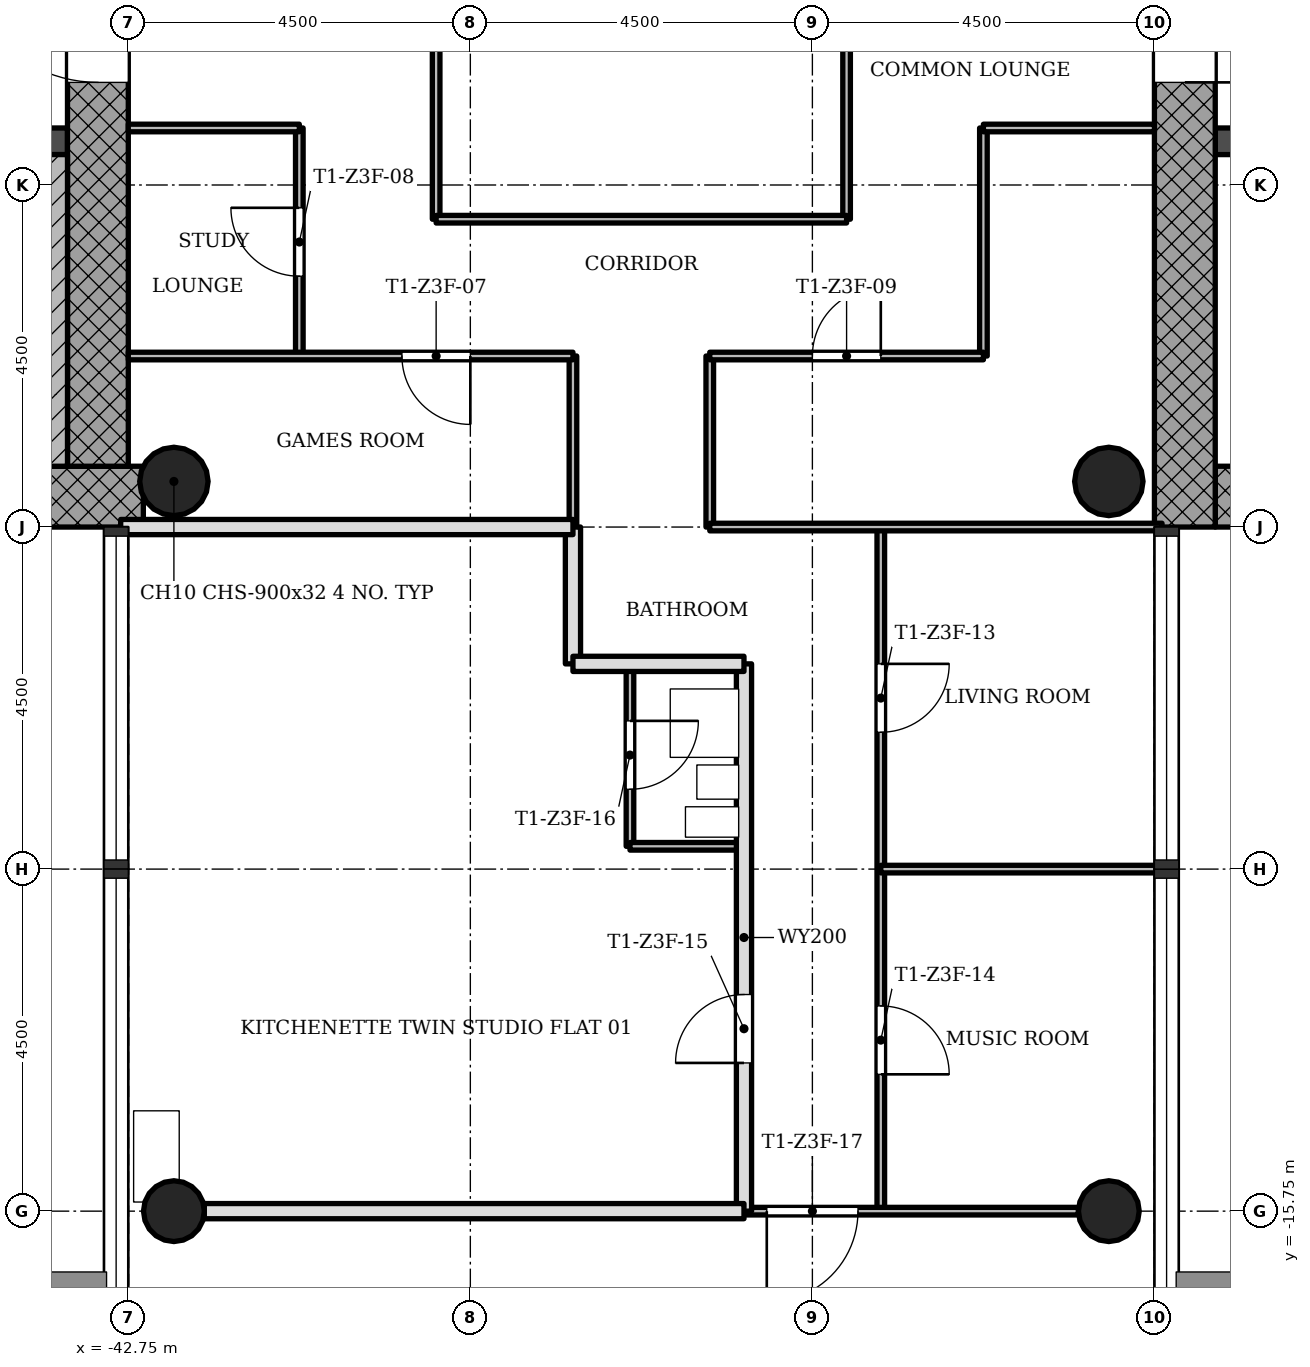
"""IFC4 building model, lengths in metres.
Left out: names, types, materials, properties, quantities, classifications, styles, units other than length and angle.
Written with IfcOpenShell. Run it as: python <this file> out.ifc"""

import sys

from ifc_helpers import new_model, si_unit, direction, frame, frame_2d, origin, origin_2d, place, context, subcontext, project, spatial, rectangle, hollow_circle, extrude, element, fill, save


model = new_model("IFC4")
c1 = context("Model", 3, precision=1e-05, world=origin(), true_north=direction((0.0, 1.0)))
c2 = subcontext(c1, "Body", "Model", "MODEL_VIEW")
j1 = project(units=[si_unit("LENGTHUNIT", "METRE"), si_unit("PLANEANGLEUNIT", "RADIAN")], contexts=[c1])
p1 = place(None, origin())
s1 = spatial("IfcSite", under=j1, at=p1, CompositionType="ELEMENT")
p2 = place(p1, origin())
s2 = spatial("IfcBuilding", under=s1, at=p2, CompositionType="ELEMENT")
p3 = place(p2, frame((0.0, 0.0, 171.1)))
s3 = spatial("IfcBuildingStorey", under=s2, at=p3, CompositionType="ELEMENT", Elevation=171.1)
p4 = place(p3, frame((-28.45, -6.35, 0.0), z_axis=(0.0, 0.0, 1.0), x_axis=(1.0, 0.0, 0.0)))
e1 = element("IfcWall", 1, at=p4, inside=s3, PredefinedType="SHEAR", context=c2, shape_type="SweptSolid", body=[
    extrude(rectangle(XDim=8.2, YDim=0.8, at=frame_2d((4.1, 0.0))), origin(), (0.0, 0.0, 1.0), 3.4),
])
p5 = place(p3, frame((-28.85, 5.95, 0.0), z_axis=(0.0, 0.0, 1.0), x_axis=(0.0, -1.0, 0.0)))
e2 = element("IfcWall", 2, at=p5, inside=s3, PredefinedType="SHEAR", context=c2, shape_type="SweptSolid", body=[
    extrude(rectangle(XDim=12.7, YDim=0.8, at=frame_2d((6.35, 0.0))), origin(), (0.0, 0.0, 1.0), 3.4),
])
p6 = place(p5, frame((5.05, 0.0, 0.0)))
e3 = element("IfcOpeningElement", 3, at=p6, cuts=e2, PredefinedType="OPENING", context=c2, shape_type="SweptSolid", body=[
    extrude(rectangle(XDim=1.8, YDim=2.1, at=frame_2d((0.9, 1.05))), frame((0.0, 0.41, 0.0), z_axis=(0.0, -1.0, 0.0), x_axis=(1.0, 0.0, 0.0)), (0.0, 0.0, 1.0), 0.82),
])
p7 = place(p3, frame((-28.45, -1.675, 0.0), z_axis=(0.0, 0.0, 1.0), x_axis=(1.0, 0.0, 0.0)))
e4 = element("IfcWall", 4, at=p7, inside=s3, PredefinedType="SHEAR", context=c2, shape_type="SweptSolid", body=[
    extrude(rectangle(XDim=7.4, YDim=0.35, at=frame_2d((3.7, 0.0))), origin(), (0.0, 0.0, 1.0), 3.4),
])
p8 = place(p7, frame((0.95, 0.0, 0.0)))
e5 = element("IfcOpeningElement", 5, at=p8, cuts=e4, PredefinedType="OPENING", context=c2, shape_type="SweptSolid", body=[
    extrude(rectangle(XDim=1.1, YDim=2.1, at=frame_2d((0.55, 1.05))), frame((0.0, 0.185, 0.0), z_axis=(0.0, -1.0, 0.0), x_axis=(1.0, 0.0, 0.0)), (0.0, 0.0, 1.0), 0.37),
])
p9 = place(p7, frame((3.15, 0.0, 0.0)))
e6 = element("IfcOpeningElement", 6, at=p9, cuts=e4, PredefinedType="OPENING", context=c2, shape_type="SweptSolid", body=[
    extrude(rectangle(XDim=1.1, YDim=2.1, at=frame_2d((0.55, 1.05))), frame((0.0, 0.185, 0.0), z_axis=(0.0, -1.0, 0.0), x_axis=(1.0, 0.0, 0.0)), (0.0, 0.0, 1.0), 0.37),
])
p10 = place(p7, frame((5.35, 0.0, 0.0)))
e7 = element("IfcOpeningElement", 7, at=p10, cuts=e4, PredefinedType="OPENING", context=c2, shape_type="SweptSolid", body=[
    extrude(rectangle(XDim=1.1, YDim=2.1, at=frame_2d((0.55, 1.05))), frame((0.0, 0.185, 0.0), z_axis=(0.0, -1.0, 0.0), x_axis=(1.0, 0.0, 0.0)), (0.0, 0.0, 1.0), 0.37),
])
p11 = place(p3, frame((-50.95, -6.35, 0.0), z_axis=(0.0, 0.0, 1.0), x_axis=(1.0, 0.0, 0.0)))
e8 = element("IfcWall", 8, at=p11, inside=s3, PredefinedType="SHEAR", context=c2, shape_type="SweptSolid", body=[
    extrude(rectangle(XDim=8.398, YDim=0.8, at=frame_2d((4.199, 0.0))), origin(), (0.0, 0.0, 1.0), 3.4),
])
p12 = place(p3, frame((-43.15, -5.95, 0.0), z_axis=(0.0, 0.0, 1.0), x_axis=(0.0, 1.0, 0.0)))
e9 = element("IfcWall", 9, at=p12, inside=s3, PredefinedType="SHEAR", context=c2, shape_type="SweptSolid", body=[
    extrude(rectangle(XDim=12.7, YDim=0.8, at=frame_2d((6.35, 0.0))), origin(), (0.0, 0.0, 1.0), 3.4),
])
p13 = place(p12, frame((5.05, 0.0, 0.0)))
e10 = element("IfcOpeningElement", 10, at=p13, cuts=e9, PredefinedType="OPENING", context=c2, shape_type="SweptSolid", body=[
    extrude(rectangle(XDim=1.8, YDim=2.1, at=frame_2d((0.9, 1.05))), frame((0.0, 0.41, 0.0), z_axis=(0.0, -1.0, 0.0), x_axis=(1.0, 0.0, 0.0)), (0.0, 0.0, 1.0), 0.82),
])
p14 = place(p3, frame((-50.95, -1.675, 0.0), z_axis=(0.0, 0.0, 1.0), x_axis=(1.0, 0.0, 0.0)))
e11 = element("IfcWall", 11, at=p14, inside=s3, PredefinedType="SHEAR", context=c2, shape_type="SweptSolid", body=[
    extrude(rectangle(XDim=7.4, YDim=0.35, at=frame_2d((3.7, 0.0))), origin(), (0.0, 0.0, 1.0), 3.4),
])
p15 = place(p14, frame((5.65, 0.0, 0.0)))
e12 = element("IfcOpeningElement", 12, at=p15, cuts=e11, PredefinedType="OPENING", context=c2, shape_type="SweptSolid", body=[
    extrude(rectangle(XDim=0.9, YDim=2.1, at=frame_2d((0.45, 1.05))), frame((0.0, 0.185, 0.0), z_axis=(0.0, -1.0, 0.0), x_axis=(1.0, 0.0, 0.0)), (0.0, 0.0, 1.0), 0.37),
])
for number, where, z_axis, x_axis in (
    (13, (-42.15, -15.75, 0.0), (0.0, 0.0, 1.0), (1.0, 0.0, 0.0)),
    (14, (-29.85, -15.75, 0.0), (0.0, 0.0, 1.0), (1.0, 0.0, 0.0)),
):
    element("IfcColumn", number, at=place(p3, frame(where, z_axis=z_axis, x_axis=x_axis)), inside=s3, PredefinedType="COLUMN", context=c2, shape_type="SweptSolid", body=[
        extrude(hollow_circle(Radius=0.4, WallThickness=0.028, at=origin_2d()), origin(), (0.0, 0.0, 1.0), 3.4),
    ])
for number, where, z_axis, x_axis in (
    (15, (-42.15, -6.15, 0.0), (0.0, 0.0, 1.0), (1.0, 0.0, 0.0)),
    (16, (-29.85, -6.15, 0.0), (0.0, 0.0, 1.0), (1.0, 0.0, 0.0)),
):
    element("IfcColumn", number, at=place(p3, frame(where, z_axis=z_axis, x_axis=x_axis)), inside=s3, PredefinedType="COLUMN", context=c2, shape_type="SweptSolid", body=[
        extrude(hollow_circle(Radius=0.45, WallThickness=0.032, at=origin_2d()), origin(), (0.0, 0.0, 1.0), 3.4),
    ])
p16 = place(p3, frame((-40.5, -4.5, 0.0), z_axis=(0.0, 0.0, 1.0), x_axis=(0.0, 1.0, 0.0)))
e17 = element("IfcWall", 17, at=p16, inside=s3, PredefinedType="PARTITIONING", context=c2, shape_type="SweptSolid", body=[
    extrude(rectangle(XDim=3.0, YDim=0.1, at=frame_2d((1.5, 0.0))), origin(), (0.0, 0.0, 1.0), 3.0),
])
p17 = place(p16, frame((1.05, 0.0, 0.0)))
e18 = element("IfcOpeningElement", 18, at=p17, cuts=e17, PredefinedType="OPENING", context=c2, shape_type="SweptSolid", body=[
    extrude(rectangle(XDim=0.9, YDim=2.1, at=frame_2d((0.45, 1.05))), frame((0.0, 0.06, 0.0), z_axis=(0.0, -1.0, 0.0), x_axis=(1.0, 0.0, 0.0)), (0.0, 0.0, 1.0), 0.12),
])
p18 = place(p3, frame((-38.7, -2.7, 0.0), z_axis=(0.0, 0.0, 1.0), x_axis=(0.0, 1.0, 0.0)))
e19 = element("IfcWall", 19, at=p18, inside=s3, PredefinedType="PARTITIONING", context=c2, shape_type="SweptSolid", body=[
    extrude(rectangle(XDim=5.4, YDim=0.1, at=frame_2d((2.7, 0.0))), origin(), (0.0, 0.0, 1.0), 3.0),
])
p19 = place(p3, frame((-36.9, -6.75, 0.0), z_axis=(0.0, 0.0, 1.0), x_axis=(0.0, 1.0, 0.0)))
e20 = element("IfcWall", 20, at=p19, inside=s3, PredefinedType="PARTITIONING", context=c2, shape_type="SweptSolid", body=[
    extrude(rectangle(XDim=2.25, YDim=0.1, at=frame_2d((1.125, 0.0))), origin(), (0.0, 0.0, 1.0), 3.0),
])
p20 = place(p3, frame((-36.9, -8.55, 0.0), z_axis=(0.0, 0.0, 1.0), x_axis=(0.0, 1.0, 0.0)))
e21 = element("IfcWall", 21, at=p20, inside=s3, PredefinedType="SOLIDWALL", context=c2, shape_type="SweptSolid", body=[
    extrude(rectangle(XDim=1.8, YDim=0.2, at=frame_2d((0.9, 0.0))), origin(), (0.0, 0.0, 1.0), 3.0),
])
p21 = place(p3, frame((-36.15, -10.95, 0.0), z_axis=(0.0, 0.0, 1.0), x_axis=(0.0, 1.0, 0.0)))
e22 = element("IfcWall", 22, at=p21, inside=s3, PredefinedType="PARTITIONING", context=c2, shape_type="SweptSolid", body=[
    extrude(rectangle(XDim=2.4, YDim=0.1, at=frame_2d((1.2, 0.0))), origin(), (0.0, 0.0, 1.0), 3.0),
])
p22 = place(p21, frame((0.75, 0.0, 0.0)))
e23 = element("IfcOpeningElement", 23, at=p22, cuts=e22, PredefinedType="OPENING", context=c2, shape_type="SweptSolid", body=[
    extrude(rectangle(XDim=0.9, YDim=2.1, at=frame_2d((0.45, 1.05))), frame((0.0, 0.06, 0.0), z_axis=(0.0, -1.0, 0.0), x_axis=(1.0, 0.0, 0.0)), (0.0, 0.0, 1.0), 0.12),
])
p23 = place(p3, frame((-35.1, -6.75, 0.0), z_axis=(0.0, 0.0, 1.0), x_axis=(0.0, 1.0, 0.0)))
e24 = element("IfcWall", 24, at=p23, inside=s3, PredefinedType="PARTITIONING", context=c2, shape_type="SweptSolid", body=[
    extrude(rectangle(XDim=2.25, YDim=0.1, at=frame_2d((1.125, 0.0))), origin(), (0.0, 0.0, 1.0), 3.0),
])
p24 = place(p3, frame((-34.65, -15.75, 0.0), z_axis=(0.0, 0.0, 1.0), x_axis=(0.0, 1.0, 0.0)))
e25 = element("IfcWall", 25, at=p24, inside=s3, PredefinedType="SOLIDWALL", context=c2, shape_type="SweptSolid", body=[
    extrude(rectangle(XDim=7.2, YDim=0.2, at=frame_2d((3.6, 0.0))), origin(), (0.0, 0.0, 1.0), 3.0),
])
p25 = place(p24, frame((1.95, 0.0, 0.0)))
e26 = element("IfcOpeningElement", 26, at=p25, cuts=e25, PredefinedType="OPENING", context=c2, shape_type="SweptSolid", body=[
    extrude(rectangle(XDim=0.9, YDim=2.1, at=frame_2d((0.45, 1.05))), frame((0.0, 0.11, 0.0), z_axis=(0.0, -1.0, 0.0), x_axis=(1.0, 0.0, 0.0)), (0.0, 0.0, 1.0), 0.22),
])
p26 = place(p3, frame((-33.3, -2.7, 0.0), z_axis=(0.0, 0.0, 1.0), x_axis=(0.0, 1.0, 0.0)))
e27 = element("IfcWall", 27, at=p26, inside=s3, PredefinedType="PARTITIONING", context=c2, shape_type="SweptSolid", body=[
    extrude(rectangle(XDim=5.4, YDim=0.1, at=frame_2d((2.7, 0.0))), origin(), (0.0, 0.0, 1.0), 3.0),
])
p27 = place(p26, frame((2.25, 0.0, 0.0)))
e28 = element("IfcOpeningElement", 28, at=p27, cuts=e27, PredefinedType="OPENING", context=c2, shape_type="SweptSolid", body=[
    extrude(rectangle(XDim=0.9, YDim=2.1, at=frame_2d((0.45, 1.05))), frame((0.0, 0.06, 0.0), z_axis=(0.0, -1.0, 0.0), x_axis=(1.0, 0.0, 0.0)), (0.0, 0.0, 1.0), 0.12),
])
p28 = place(p3, frame((-32.85, -15.75, 0.0), z_axis=(0.0, 0.0, 1.0), x_axis=(0.0, 1.0, 0.0)))
e29 = element("IfcWall", 29, at=p28, inside=s3, PredefinedType="PARTITIONING", context=c2, shape_type="SweptSolid", body=[
    extrude(rectangle(XDim=9.0, YDim=0.1, at=frame_2d((4.5, 0.0))), origin(), (0.0, 0.0, 1.0), 3.0),
])
p29 = place(p28, frame((6.3, 0.0, 0.0)))
e30 = element("IfcOpeningElement", 30, at=p29, cuts=e29, PredefinedType="OPENING", context=c2, shape_type="SweptSolid", body=[
    extrude(rectangle(XDim=0.9, YDim=2.1, at=frame_2d((0.45, 1.05))), frame((0.0, 0.06, 0.0), z_axis=(0.0, -1.0, 0.0), x_axis=(1.0, 0.0, 0.0)), (0.0, 0.0, 1.0), 0.12),
])
p30 = place(p28, frame((1.8, 0.0, 0.0)))
e31 = element("IfcOpeningElement", 31, at=p30, cuts=e29, PredefinedType="OPENING", context=c2, shape_type="SweptSolid", body=[
    extrude(rectangle(XDim=0.9, YDim=2.1, at=frame_2d((0.45, 1.05))), frame((0.0, 0.06, 0.0), z_axis=(0.0, -1.0, 0.0), x_axis=(1.0, 0.0, 0.0)), (0.0, 0.0, 1.0), 0.12),
])
p31 = place(p3, frame((-31.5, -4.5, 0.0), z_axis=(0.0, 0.0, 1.0), x_axis=(0.0, 1.0, 0.0)))
e32 = element("IfcWall", 32, at=p31, inside=s3, PredefinedType="PARTITIONING", context=c2, shape_type="SweptSolid", body=[
    extrude(rectangle(XDim=3.0, YDim=0.1, at=frame_2d((1.5, 0.0))), origin(), (0.0, 0.0, 1.0), 3.0),
])
p32 = place(p3, frame((-34.65, -15.75, 0.0), z_axis=(0.0, 0.0, 1.0), x_axis=(1.0, 0.0, 0.0)))
e33 = element("IfcWall", 33, at=p32, inside=s3, PredefinedType="PARTITIONING", context=c2, shape_type="SweptSolid", body=[
    extrude(rectangle(XDim=4.4, YDim=0.1, at=frame_2d((2.2, 0.0))), origin(), (0.0, 0.0, 1.0), 3.0),
])
p33 = place(p32, frame((0.3, 0.0, 0.0)))
e34 = element("IfcOpeningElement", 34, at=p33, cuts=e33, PredefinedType="OPENING", context=c2, shape_type="SweptSolid", body=[
    extrude(rectangle(XDim=1.2, YDim=2.1, at=frame_2d((0.6, 1.05))), frame((0.0, 0.06, 0.0), z_axis=(0.0, -1.0, 0.0), x_axis=(1.0, 0.0, 0.0)), (0.0, 0.0, 1.0), 0.12),
])
p34 = place(p3, frame((-41.75, -15.75, 0.0), z_axis=(0.0, 0.0, 1.0), x_axis=(1.0, 0.0, 0.0)))
e35 = element("IfcWall", 35, at=p34, inside=s3, PredefinedType="SOLIDWALL", context=c2, shape_type="SweptSolid", body=[
    extrude(rectangle(XDim=7.1, YDim=0.2, at=frame_2d((3.55, 0.0))), origin(), (0.0, 0.0, 1.0), 3.0),
])
p35 = place(p3, frame((-32.85, -11.25, 0.0), z_axis=(0.0, 0.0, 1.0), x_axis=(1.0, 0.0, 0.0)))
e36 = element("IfcWall", 36, at=p35, inside=s3, PredefinedType="PARTITIONING", context=c2, shape_type="SweptSolid", body=[
    extrude(rectangle(XDim=3.7, YDim=0.1, at=frame_2d((1.85, 0.0))), origin(), (0.0, 0.0, 1.0), 3.0),
])
p36 = place(p3, frame((-36.15, -10.95, 0.0), z_axis=(0.0, 0.0, 1.0), x_axis=(1.0, 0.0, 0.0)))
e37 = element("IfcWall", 37, at=p36, inside=s3, PredefinedType="PARTITIONING", context=c2, shape_type="SweptSolid", body=[
    extrude(rectangle(XDim=1.5, YDim=0.1, at=frame_2d((0.75, 0.0))), origin(), (0.0, 0.0, 1.0), 3.0),
])
p37 = place(p3, frame((-36.9, -8.55, 0.0), z_axis=(0.0, 0.0, 1.0), x_axis=(1.0, 0.0, 0.0)))
e38 = element("IfcWall", 38, at=p37, inside=s3, PredefinedType="SOLIDWALL", context=c2, shape_type="SweptSolid", body=[
    extrude(rectangle(XDim=2.25, YDim=0.2, at=frame_2d((1.125, 0.0))), origin(), (0.0, 0.0, 1.0), 3.0),
])
p38 = place(p3, frame((-35.1, -6.75, 0.0), z_axis=(0.0, 0.0, 1.0), x_axis=(1.0, 0.0, 0.0)))
e39 = element("IfcWall", 39, at=p38, inside=s3, PredefinedType="PARTITIONING", context=c2, shape_type="SweptSolid", body=[
    extrude(rectangle(XDim=5.95, YDim=0.1, at=frame_2d((2.975, 0.0))), origin(), (0.0, 0.0, 1.0), 3.0),
])
p39 = place(p3, frame((-42.85, -6.75, 0.0), z_axis=(0.0, 0.0, 1.0), x_axis=(1.0, 0.0, 0.0)))
e40 = element("IfcWall", 40, at=p39, inside=s3, PredefinedType="SOLIDWALL", context=c2, shape_type="SweptSolid", body=[
    extrude(rectangle(XDim=5.95, YDim=0.2, at=frame_2d((2.975, 0.0))), origin(), (0.0, 0.0, 1.0), 3.0),
])
p40 = place(p3, frame((-42.75, -4.5, 0.0), z_axis=(0.0, 0.0, 1.0), x_axis=(1.0, 0.0, 0.0)))
e41 = element("IfcWall", 41, at=p40, inside=s3, PredefinedType="PARTITIONING", context=c2, shape_type="SweptSolid", body=[
    extrude(rectangle(XDim=5.85, YDim=0.1, at=frame_2d((2.925, 0.0))), origin(), (0.0, 0.0, 1.0), 3.0),
])
p41 = place(p40, frame((3.6, 0.0, 0.0)))
e42 = element("IfcOpeningElement", 42, at=p41, cuts=e41, PredefinedType="OPENING", context=c2, shape_type="SweptSolid", body=[
    extrude(rectangle(XDim=0.9, YDim=2.1, at=frame_2d((0.45, 1.05))), frame((0.0, 0.06, 0.0), z_axis=(0.0, -1.0, 0.0), x_axis=(1.0, 0.0, 0.0)), (0.0, 0.0, 1.0), 0.12),
])
p42 = place(p3, frame((-35.1, -4.5, 0.0), z_axis=(0.0, 0.0, 1.0), x_axis=(1.0, 0.0, 0.0)))
e43 = element("IfcWall", 43, at=p42, inside=s3, PredefinedType="PARTITIONING", context=c2, shape_type="SweptSolid", body=[
    extrude(rectangle(XDim=3.6, YDim=0.1, at=frame_2d((1.8, 0.0))), origin(), (0.0, 0.0, 1.0), 3.0),
])
p43 = place(p42, frame((1.35, 0.0, 0.0)))
e44 = element("IfcOpeningElement", 44, at=p43, cuts=e43, PredefinedType="OPENING", context=c2, shape_type="SweptSolid", body=[
    extrude(rectangle(XDim=0.9, YDim=2.1, at=frame_2d((0.45, 1.05))), frame((0.0, 0.06, 0.0), z_axis=(0.0, -1.0, 0.0), x_axis=(1.0, 0.0, 0.0)), (0.0, 0.0, 1.0), 0.12),
])
p44 = place(p3, frame((-38.7, -2.7, 0.0), z_axis=(0.0, 0.0, 1.0), x_axis=(1.0, 0.0, 0.0)))
e45 = element("IfcWall", 45, at=p44, inside=s3, PredefinedType="PARTITIONING", context=c2, shape_type="SweptSolid", body=[
    extrude(rectangle(XDim=5.4, YDim=0.1, at=frame_2d((2.7, 0.0))), origin(), (0.0, 0.0, 1.0), 3.0),
])
for number, where, z_axis, x_axis in (
    (46, (-42.75, -1.5, 0.0), (0.0, 0.0, 1.0), (1.0, 0.0, 0.0)),
    (47, (-31.5, -1.5, 0.0), (0.0, 0.0, 1.0), (1.0, 0.0, 0.0)),
):
    element("IfcWall", number, at=place(p3, frame(where, z_axis=z_axis, x_axis=x_axis)), inside=s3, PredefinedType="PARTITIONING", context=c2, shape_type="SweptSolid", body=[
        extrude(rectangle(XDim=2.25, YDim=0.1, at=frame_2d((1.125, 0.0))), origin(), (0.0, 0.0, 1.0), 3.0),
    ])
p45 = place(p3, frame((-43.75, -1.85, 0.0), z_axis=(0.0, 0.0, 1.0), x_axis=(0.0, -1.0, 0.0)))
e48 = element("IfcWall", 48, at=p45, inside=s3, PredefinedType="SHEAR", context=c2, shape_type="SweptSolid", body=[
    extrude(rectangle(XDim=4.1, YDim=0.4, at=frame_2d((2.05, 0.0))), origin(), (0.0, 0.0, 1.0), 3.4),
])
p46 = place(p41, origin())
e49 = element("IfcDoor", 49, at=p46, inside=s3, OperationType="SINGLE_SWING_RIGHT", PredefinedType="DOOR", context=c2, shape_type="SweptSolid", body=[
    extrude(rectangle(XDim=0.9, YDim=2.1, at=frame_2d((0.45, 1.05))), frame((0.0, 0.025, 0.0), z_axis=(0.0, -1.0, 0.0), x_axis=(1.0, 0.0, 0.0)), (0.0, 0.0, 1.0), 0.05),
])
fill(e42, e49)
p47 = place(p17, origin())
e50 = element("IfcDoor", 50, at=p47, inside=s3, OperationType="SINGLE_SWING_LEFT", PredefinedType="DOOR", context=c2, shape_type="SweptSolid", body=[
    extrude(rectangle(XDim=0.9, YDim=2.1, at=frame_2d((0.45, 1.05))), frame((0.0, 0.025, 0.0), z_axis=(0.0, -1.0, 0.0), x_axis=(1.0, 0.0, 0.0)), (0.0, 0.0, 1.0), 0.05),
])
fill(e18, e50)
p48 = place(p43, origin())
e51 = element("IfcDoor", 51, at=p48, inside=s3, OperationType="SINGLE_SWING_LEFT", PredefinedType="DOOR", context=c2, shape_type="SweptSolid", body=[
    extrude(rectangle(XDim=0.9, YDim=2.1, at=frame_2d((0.45, 1.05))), frame((0.0, 0.025, 0.0), z_axis=(0.0, -1.0, 0.0), x_axis=(1.0, 0.0, 0.0)), (0.0, 0.0, 1.0), 0.05),
])
fill(e44, e51)
p49 = place(p29, origin())
e52 = element("IfcDoor", 52, at=p49, inside=s3, OperationType="SINGLE_SWING_RIGHT", PredefinedType="DOOR", context=c2, shape_type="SweptSolid", body=[
    extrude(rectangle(XDim=0.9, YDim=2.1, at=frame_2d((0.45, 1.05))), frame((0.0, 0.025, 0.0), z_axis=(0.0, -1.0, 0.0), x_axis=(1.0, 0.0, 0.0)), (0.0, 0.0, 1.0), 0.05),
])
fill(e30, e52)
p50 = place(p30, origin())
e53 = element("IfcDoor", 53, at=p50, inside=s3, OperationType="SINGLE_SWING_LEFT", PredefinedType="DOOR", context=c2, shape_type="SweptSolid", body=[
    extrude(rectangle(XDim=0.9, YDim=2.1, at=frame_2d((0.45, 1.05))), frame((0.0, 0.025, 0.0), z_axis=(0.0, -1.0, 0.0), x_axis=(1.0, 0.0, 0.0)), (0.0, 0.0, 1.0), 0.05),
])
fill(e31, e53)
p51 = place(p25, origin())
e54 = element("IfcDoor", 54, at=p51, inside=s3, OperationType="SINGLE_SWING_RIGHT", PredefinedType="DOOR", context=c2, shape_type="SweptSolid", body=[
    extrude(rectangle(XDim=0.9, YDim=2.1, at=frame_2d((0.45, 1.05))), frame((0.0, 0.025, 0.0), z_axis=(0.0, -1.0, 0.0), x_axis=(1.0, 0.0, 0.0)), (0.0, 0.0, 1.0), 0.05),
])
fill(e26, e54)
p52 = place(p22, origin())
e55 = element("IfcDoor", 55, at=p52, inside=s3, OperationType="SINGLE_SWING_RIGHT", PredefinedType="DOOR", context=c2, shape_type="SweptSolid", body=[
    extrude(rectangle(XDim=0.9, YDim=2.1, at=frame_2d((0.45, 1.05))), frame((0.0, 0.025, 0.0), z_axis=(0.0, -1.0, 0.0), x_axis=(1.0, 0.0, 0.0)), (0.0, 0.0, 1.0), 0.05),
])
fill(e23, e55)
p53 = place(p33, origin())
e56 = element("IfcDoor", 56, at=p53, inside=s3, OperationType="SINGLE_SWING_LEFT", PredefinedType="DOOR", context=c2, shape_type="SweptSolid", body=[
    extrude(rectangle(XDim=1.2, YDim=2.1, at=frame_2d((0.6, 1.05))), frame((0.0, 0.025, 0.0), z_axis=(0.0, -1.0, 0.0), x_axis=(1.0, 0.0, 0.0)), (0.0, 0.0, 1.0), 0.05),
])
fill(e34, e56)
p54 = place(p6, origin())
e57 = element("IfcDoor", 57, at=p54, inside=s3, OperationType="SINGLE_SWING_LEFT", PredefinedType="DOOR", context=c2, shape_type="SweptSolid", body=[
    extrude(rectangle(XDim=1.8, YDim=2.1, at=frame_2d((0.9, 1.05))), frame((0.0, 0.025, 0.0), z_axis=(0.0, -1.0, 0.0), x_axis=(1.0, 0.0, 0.0)), (0.0, 0.0, 1.0), 0.05),
])
fill(e3, e57)
p55 = place(p13, origin())
e58 = element("IfcDoor", 58, at=p55, inside=s3, OperationType="SINGLE_SWING_LEFT", PredefinedType="DOOR", context=c2, shape_type="SweptSolid", body=[
    extrude(rectangle(XDim=1.8, YDim=2.1, at=frame_2d((0.9, 1.05))), frame((0.0, 0.025, 0.0), z_axis=(0.0, -1.0, 0.0), x_axis=(1.0, 0.0, 0.0)), (0.0, 0.0, 1.0), 0.05),
])
fill(e10, e58)
save(model, sys.argv[1])
